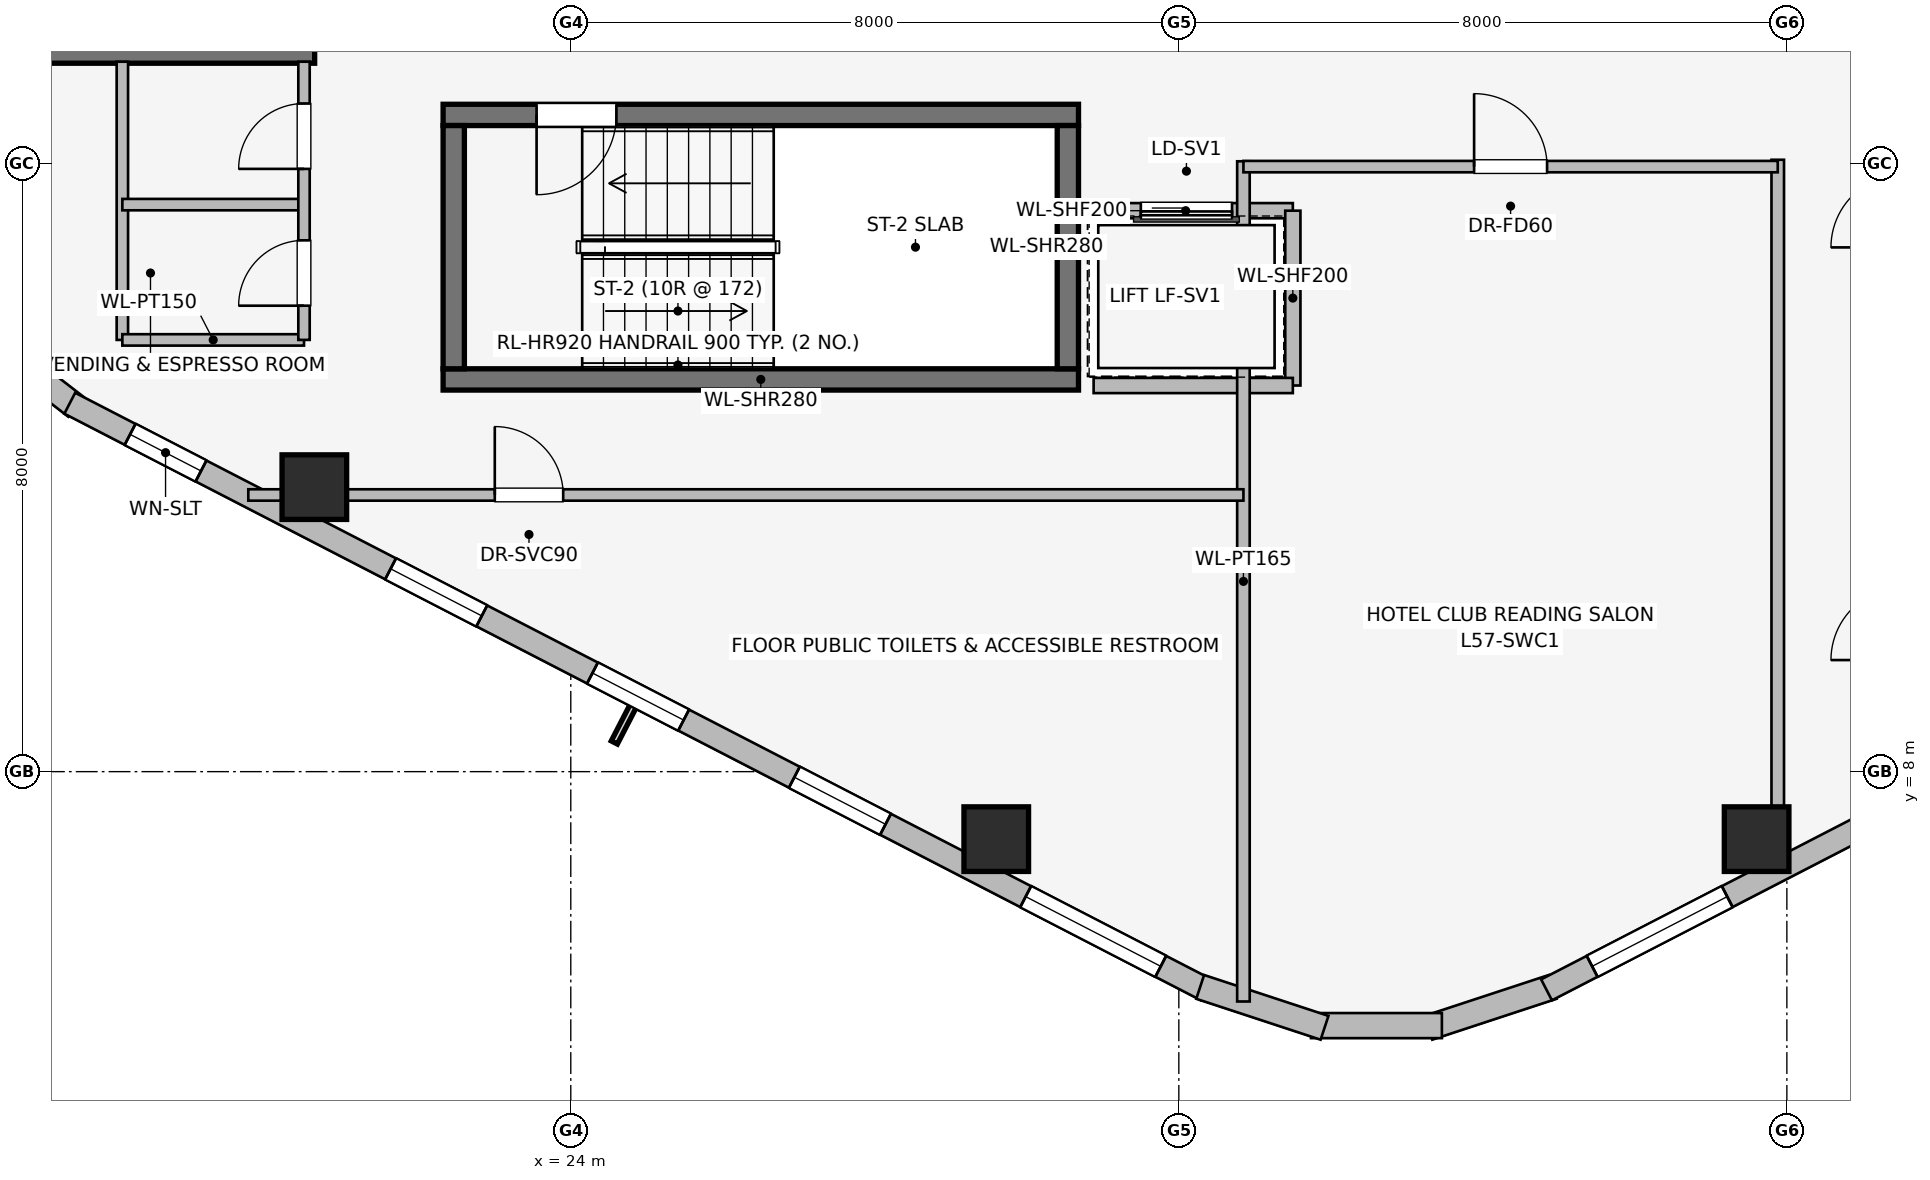
"""IFC4 building model, lengths in metres.
Left out: names, types, materials, properties, quantities, classifications, styles, units other than length and angle.
Written with IfcOpenShell. Run it as: python <this file> out.ifc"""

import sys

from ifc_helpers import new_model, si_unit, direction, frame, frame_2d, origin, origin_2d, place, context, subcontext, project, spatial, rectangle, extrude, element, fill, save


model = new_model("IFC4")
c1 = context("Model", 3, precision=1e-05, world=origin(), true_north=direction((0.0, 1.0)))
c2 = subcontext(c1, "Body", "Model", "MODEL_VIEW")
j1 = project(units=[si_unit("LENGTHUNIT", "METRE"), si_unit("PLANEANGLEUNIT", "RADIAN")], contexts=[c1])
p1 = place(None, origin())
s1 = spatial("IfcSite", under=j1, at=p1, CompositionType="ELEMENT")
p2 = place(p1, origin())
s2 = spatial("IfcBuilding", under=s1, at=p2, CompositionType="ELEMENT")
p3 = place(p2, frame((0.0, 0.0, 210.25)))
s3 = spatial("IfcBuildingStorey", under=s2, at=p3, CompositionType="ELEMENT", Elevation=210.25)
p4 = place(p3, frame((16.87, 17.46, 0.0), z_axis=(0.0, 0.0, 1.0), x_axis=(1.0, 0.0, 0.0)))
e1 = element("IfcWall", 1, at=p4, inside=s3, PredefinedType="SHEAR", context=c2, shape_type="SweptSolid", body=[
    extrude(rectangle(XDim=3.76, YDim=0.28, at=frame_2d((1.88, 0.0))), origin(), (0.0, 0.0, 1.0), 3.45),
])
p5 = place(p3, frame((22.32, 13.16, 0.0), z_axis=(0.0, 0.0, 1.0), x_axis=(1.0, 0.0, 0.0)))
e2 = element("IfcWall", 2, at=p5, inside=s3, PredefinedType="SHEAR", context=c2, shape_type="SweptSolid", body=[
    extrude(rectangle(XDim=8.36, YDim=0.28, at=frame_2d((4.18, 0.0))), origin(), (0.0, 0.0, 1.0), 3.45),
])
p6 = place(p3, frame((30.68, 16.64, 0.0), z_axis=(0.0, 0.0, 1.0), x_axis=(-1.0, 0.0, 0.0)))
e3 = element("IfcWall", 3, at=p6, inside=s3, PredefinedType="SHEAR", context=c2, shape_type="SweptSolid", body=[
    extrude(rectangle(XDim=8.36, YDim=0.28, at=frame_2d((4.18, 0.0))), origin(), (0.0, 0.0, 1.0), 3.45),
])
p7 = place(p6, frame((6.08, 0.0, 0.0)))
e4 = element("IfcOpeningElement", 4, at=p7, cuts=e3, PredefinedType="OPENING", context=c2, shape_type="SweptSolid", body=[
    extrude(rectangle(XDim=1.05, YDim=2.0, at=frame_2d((0.525, 1.0))), frame((0.0, 0.15, 0.0), z_axis=(0.0, -1.0, 0.0), x_axis=(1.0, 0.0, 0.0)), (0.0, 0.0, 1.0), 0.3),
])
for number, where, z_axis, x_axis in (
    (5, (22.46, 16.5, 0.0), (0.0, 0.0, 1.0), (0.0, -1.0, 0.0)),
    (6, (30.54, 13.3, 0.0), (0.0, 0.0, 1.0), (0.0, 1.0, 0.0)),
):
    element("IfcWall", number, at=place(p3, frame(where, z_axis=z_axis, x_axis=x_axis)), inside=s3, PredefinedType="SHEAR", context=c2, shape_type="SweptSolid", body=[
        extrude(rectangle(XDim=3.2, YDim=0.28, at=frame_2d((1.6, 0.0))), origin(), (0.0, 0.0, 1.0), 3.45),
    ])
for number, where, z_axis, x_axis in (
    (7, (20.626, 11.743, 0.0), (0.0, 0.0, 1.0), (1.0, 0.0, 0.0)),
    (8, (29.598, 7.112, 0.0), (0.0, 0.0, 1.0), (1.0, 0.0, 0.0)),
    (9, (39.602, 7.112, 0.0), (0.0, 0.0, 1.0), (1.0, 0.0, 0.0)),
):
    element("IfcColumn", number, at=place(p3, frame(where, z_axis=z_axis, x_axis=x_axis)), inside=s3, PredefinedType="COLUMN", context=c2, shape_type="SweptSolid", body=[
        extrude(rectangle(XDim=0.85, YDim=0.85, at=origin_2d()), origin(), (0.0, 0.0, 1.0), 3.45),
    ])
p8 = place(p3, frame((17.489, 12.8, 0.0), z_axis=(0.0, 0.0, 1.0), x_axis=(-0.791409877269, 0.611285862884, 0.0)))
e10 = element("IfcWall", 10, at=p8, inside=s3, PredefinedType="STANDARD", context=c2, shape_type="SweptSolid", body=[
    extrude(rectangle(XDim=1.677, YDim=0.33, at=frame_2d((0.838, 0.0))), origin(), (0.0, 0.0, 1.0), 3.19),
])
p9 = place(p3, frame((32.362, 5.129, 0.0), z_axis=(0.0, 0.0, 1.0), x_axis=(-0.888626188278, 0.458632202867, 0.0)))
e11 = element("IfcWall", 11, at=p9, inside=s3, PredefinedType="STANDARD", context=c2, shape_type="SweptSolid", body=[
    extrude(rectangle(XDim=16.828, YDim=0.31, at=frame_2d((8.414, 0.0))), origin(), (0.0, 0.0, 1.0), 3.19),
])
p10 = place(p9, frame((0.675, 0.0, 0.75)))
e12 = element("IfcOpeningElement", 12, at=p10, cuts=e11, PredefinedType="OPENING", context=c2, shape_type="SweptSolid", body=[
    extrude(rectangle(XDim=2.0, YDim=1.5, at=frame_2d((1.0, 0.75))), frame((0.0, 0.165, 0.0), z_axis=(0.0, -1.0, 0.0), x_axis=(1.0, 0.0, 0.0)), (0.0, 0.0, 1.0), 0.33),
])
p11 = place(p9, frame((4.75, 0.0, 0.75)))
e13 = element("IfcOpeningElement", 13, at=p11, cuts=e11, PredefinedType="OPENING", context=c2, shape_type="SweptSolid", body=[
    extrude(rectangle(XDim=1.35, YDim=1.45, at=frame_2d((0.675, 0.725))), frame((0.0, 0.165, 0.0), z_axis=(0.0, -1.0, 0.0), x_axis=(1.0, 0.0, 0.0)), (0.0, 0.0, 1.0), 0.33),
])
p12 = place(p9, frame((7.739, 0.0, 0.75)))
e14 = element("IfcOpeningElement", 14, at=p12, cuts=e11, PredefinedType="OPENING", context=c2, shape_type="SweptSolid", body=[
    extrude(rectangle(XDim=1.35, YDim=1.45, at=frame_2d((0.675, 0.725))), frame((0.0, 0.165, 0.0), z_axis=(0.0, -1.0, 0.0), x_axis=(1.0, 0.0, 0.0)), (0.0, 0.0, 1.0), 0.33),
])
p13 = place(p9, frame((10.728, 0.0, 0.75)))
e15 = element("IfcOpeningElement", 15, at=p13, cuts=e11, PredefinedType="OPENING", context=c2, shape_type="SweptSolid", body=[
    extrude(rectangle(XDim=1.35, YDim=1.45, at=frame_2d((0.675, 0.725))), frame((0.0, 0.165, 0.0), z_axis=(0.0, -1.0, 0.0), x_axis=(1.0, 0.0, 0.0)), (0.0, 0.0, 1.0), 0.33),
])
p14 = place(p9, frame((14.885, 0.0, 0.75)))
e16 = element("IfcOpeningElement", 16, at=p14, cuts=e11, PredefinedType="OPENING", context=c2, shape_type="SweptSolid", body=[
    extrude(rectangle(XDim=1.05, YDim=1.4, at=frame_2d((0.525, 0.7))), frame((0.0, 0.165, 0.0), z_axis=(0.0, -1.0, 0.0), x_axis=(1.0, 0.0, 0.0)), (0.0, 0.0, 1.0), 0.33),
])
p15 = place(p3, frame((36.919, 5.168, 0.0), z_axis=(0.0, 0.0, 1.0), x_axis=(-0.949937416267, -0.312440242569, 0.0)))
e17 = element("IfcWall", 17, at=p15, inside=s3, PredefinedType="STANDARD", context=c2, shape_type="SweptSolid", body=[
    extrude(rectangle(XDim=1.722, YDim=0.33, at=frame_2d((0.861, 0.0))), origin(), (0.0, 0.0, 1.0), 3.19),
])
p16 = place(p3, frame((35.461, 4.659, 0.0), z_axis=(0.0, 0.0, 1.0), x_axis=(-1.0, 0.0, 0.0)))
e18 = element("IfcWall", 18, at=p16, inside=s3, PredefinedType="STANDARD", context=c2, shape_type="SweptSolid", body=[
    extrude(rectangle(XDim=1.722, YDim=0.33, at=frame_2d((0.861, 0.0))), origin(), (0.0, 0.0, 1.0), 3.19),
])
p17 = place(p3, frame((33.917, 4.63, 0.0), z_axis=(0.0, 0.0, 1.0), x_axis=(-0.949937416267, 0.312440242569, 0.0)))
e19 = element("IfcWall", 19, at=p17, inside=s3, PredefinedType="STANDARD", context=c2, shape_type="SweptSolid", body=[
    extrude(rectangle(XDim=1.722, YDim=0.33, at=frame_2d((0.861, 0.0))), origin(), (0.0, 0.0, 1.0), 3.19),
])
p18 = place(p3, frame((51.792, 12.847, 0.0), z_axis=(0.0, 0.0, 1.0), x_axis=(-0.888626188278, -0.458632202867, 0.0)))
e20 = element("IfcWall", 20, at=p18, inside=s3, PredefinedType="STANDARD", context=c2, shape_type="SweptSolid", body=[
    extrude(rectangle(XDim=16.828, YDim=0.31, at=frame_2d((8.414, 0.0))), origin(), (0.0, 0.0, 1.0), 3.19),
])
p19 = place(p18, frame((1.3, 0.0, 0.75)))
e21 = element("IfcOpeningElement", 21, at=p19, cuts=e20, PredefinedType="OPENING", context=c2, shape_type="SweptSolid", body=[
    extrude(rectangle(XDim=1.05, YDim=1.4, at=frame_2d((0.525, 0.7))), frame((0.0, 0.165, 0.0), z_axis=(0.0, -1.0, 0.0), x_axis=(1.0, 0.0, 0.0)), (0.0, 0.0, 1.0), 0.33),
])
p20 = place(p18, frame((4.486, 0.0, 0.75)))
e22 = element("IfcOpeningElement", 22, at=p20, cuts=e20, PredefinedType="OPENING", context=c2, shape_type="SweptSolid", body=[
    extrude(rectangle(XDim=1.35, YDim=1.45, at=frame_2d((0.675, 0.725))), frame((0.0, 0.165, 0.0), z_axis=(0.0, -1.0, 0.0), x_axis=(1.0, 0.0, 0.0)), (0.0, 0.0, 1.0), 0.33),
])
p21 = place(p18, frame((6.946, 0.0, 0.75)))
e23 = element("IfcOpeningElement", 23, at=p21, cuts=e20, PredefinedType="OPENING", context=c2, shape_type="SweptSolid", body=[
    extrude(rectangle(XDim=1.35, YDim=1.45, at=frame_2d((0.675, 0.725))), frame((0.0, 0.165, 0.0), z_axis=(0.0, -1.0, 0.0), x_axis=(1.0, 0.0, 0.0)), (0.0, 0.0, 1.0), 0.33),
])
p22 = place(p18, frame((9.406, 0.0, 0.75)))
e24 = element("IfcOpeningElement", 24, at=p22, cuts=e20, PredefinedType="OPENING", context=c2, shape_type="SweptSolid", body=[
    extrude(rectangle(XDim=1.35, YDim=1.45, at=frame_2d((0.675, 0.725))), frame((0.0, 0.165, 0.0), z_axis=(0.0, -1.0, 0.0), x_axis=(1.0, 0.0, 0.0)), (0.0, 0.0, 1.0), 0.33),
])
p23 = place(p18, frame((14.153, 0.0, 0.75)))
e25 = element("IfcOpeningElement", 25, at=p23, cuts=e20, PredefinedType="OPENING", context=c2, shape_type="SweptSolid", body=[
    extrude(rectangle(XDim=2.0, YDim=1.5, at=frame_2d((1.0, 0.75))), frame((0.0, 0.165, 0.0), z_axis=(0.0, -1.0, 0.0), x_axis=(1.0, 0.0, 0.0)), (0.0, 0.0, 1.0), 0.33),
])
p24 = place(p3, frame((33.5, 15.38, 0.0), z_axis=(0.0, 0.0, 1.0), x_axis=(-1.0, 0.0, 0.0)))
e26 = element("IfcWall", 26, at=p24, inside=s3, PredefinedType="PARTITIONING", context=c2, shape_type="SweptSolid", body=[
    extrude(rectangle(XDim=2.82, YDim=0.2, at=frame_2d((1.41, 0.0))), origin(), (0.0, 0.0, 1.0), 3.19),
])
p25 = place(p24, frame((0.8, 0.0, 0.0)))
e27 = element("IfcOpeningElement", 27, at=p25, cuts=e26, PredefinedType="OPENING", context=c2, shape_type="SweptSolid", body=[
    extrude(rectangle(XDim=1.2, YDim=2.2, at=frame_2d((0.6, 1.1))), frame((0.0, 0.11, 0.0), z_axis=(0.0, -1.0, 0.0), x_axis=(1.0, 0.0, 0.0)), (0.0, 0.0, 1.0), 0.22),
])
p26 = place(p3, frame((33.5, 13.08, 0.0), z_axis=(0.0, 0.0, 1.0), x_axis=(0.0, 1.0, 0.0)))
e28 = element("IfcWall", 28, at=p26, inside=s3, PredefinedType="PARTITIONING", context=c2, shape_type="SweptSolid", body=[
    extrude(rectangle(XDim=2.3, YDim=0.2, at=frame_2d((1.15, 0.0))), origin(), (0.0, 0.0, 1.0), 3.19),
])
p27 = place(p3, frame((30.879, 13.08, 0.0), z_axis=(0.0, 0.0, 1.0), x_axis=(1.0, 0.0, 0.0)))
e29 = element("IfcWall", 29, at=p27, inside=s3, PredefinedType="PARTITIONING", context=c2, shape_type="SweptSolid", body=[
    extrude(rectangle(XDim=2.621, YDim=0.2, at=frame_2d((1.311, 0.0))), origin(), (0.0, 0.0, 1.0), 3.19),
])
p28 = place(p3, frame((18.1, 17.34, 0.0), z_axis=(0.0, 0.0, 1.0), x_axis=(0.0, -1.0, 0.0)))
e30 = element("IfcWall", 30, at=p28, inside=s3, PredefinedType="PARTITIONING", context=c2, shape_type="SweptSolid", body=[
    extrude(rectangle(XDim=3.66, YDim=0.15, at=frame_2d((1.83, 0.0))), origin(), (0.0, 0.0, 1.0), 3.19),
])
for number, where, z_axis, x_axis in (
    (31, (18.1, 13.68, 0.0), (0.0, 0.0, 1.0), (1.0, 0.0, 0.0)),
    (32, (18.1, 15.46, 0.0), (0.0, 0.0, 1.0), (1.0, 0.0, 0.0)),
):
    element("IfcWall", number, at=place(p3, frame(where, z_axis=z_axis, x_axis=x_axis)), inside=s3, PredefinedType="PARTITIONING", context=c2, shape_type="SweptSolid", body=[
        extrude(rectangle(XDim=2.39, YDim=0.15, at=frame_2d((1.195, 0.0))), origin(), (0.0, 0.0, 1.0), 3.19),
    ])
p29 = place(p3, frame((20.49, 13.68, 0.0), z_axis=(0.0, 0.0, 1.0), x_axis=(0.0, 1.0, 0.0)))
e33 = element("IfcWall", 33, at=p29, inside=s3, PredefinedType="PARTITIONING", context=c2, shape_type="SweptSolid", body=[
    extrude(rectangle(XDim=3.66, YDim=0.15, at=frame_2d((1.83, 0.0))), origin(), (0.0, 0.0, 1.0), 3.19),
])
p30 = place(p29, frame((0.45, 0.0, 0.0)))
e34 = element("IfcOpeningElement", 34, at=p30, cuts=e33, PredefinedType="OPENING", context=c2, shape_type="SweptSolid", body=[
    extrude(rectangle(XDim=0.86, YDim=2.0, at=frame_2d((0.43, 1.0))), frame((0.0, 0.085, 0.0), z_axis=(0.0, -1.0, 0.0), x_axis=(1.0, 0.0, 0.0)), (0.0, 0.0, 1.0), 0.17),
])
p31 = place(p29, frame((2.25, 0.0, 0.0)))
e35 = element("IfcOpeningElement", 35, at=p31, cuts=e33, PredefinedType="OPENING", context=c2, shape_type="SweptSolid", body=[
    extrude(rectangle(XDim=0.86, YDim=2.0, at=frame_2d((0.43, 1.0))), frame((0.0, 0.085, 0.0), z_axis=(0.0, -1.0, 0.0), x_axis=(1.0, 0.0, 0.0)), (0.0, 0.0, 1.0), 0.17),
])
p32 = place(p3, frame((32.85, 4.976, 0.0), z_axis=(0.0, 0.0, 1.0), x_axis=(0.0, 1.0, 0.0)))
e36 = element("IfcWall", 36, at=p32, inside=s3, PredefinedType="PARTITIONING", context=c2, shape_type="SweptSolid", body=[
    extrude(rectangle(XDim=11.054, YDim=0.165, at=frame_2d((5.527, 0.0))), origin(), (0.0, 0.0, 1.0), 3.19),
])
p33 = place(p3, frame((19.757, 11.64, 0.0), z_axis=(0.0, 0.0, 1.0), x_axis=(1.0, 0.0, 0.0)))
e37 = element("IfcWall", 37, at=p33, inside=s3, PredefinedType="PARTITIONING", context=c2, shape_type="SweptSolid", body=[
    extrude(rectangle(XDim=13.093, YDim=0.15, at=frame_2d((6.546, 0.0))), origin(), (0.0, 0.0, 1.0), 3.19),
])
p34 = place(p33, frame((3.243, 0.0, 0.0)))
e38 = element("IfcOpeningElement", 38, at=p34, cuts=e37, PredefinedType="OPENING", context=c2, shape_type="SweptSolid", body=[
    extrude(rectangle(XDim=0.9, YDim=2.0, at=frame_2d((0.45, 1.0))), frame((0.0, 0.085, 0.0), z_axis=(0.0, -1.0, 0.0), x_axis=(1.0, 0.0, 0.0)), (0.0, 0.0, 1.0), 0.17),
])
p35 = place(p3, frame((39.88, 6.704, 0.0), z_axis=(0.0, 0.0, 1.0), x_axis=(0.0, 1.0, 0.0)))
e39 = element("IfcWall", 39, at=p35, inside=s3, PredefinedType="PARTITIONING", context=c2, shape_type="SweptSolid", body=[
    extrude(rectangle(XDim=9.346, YDim=0.165, at=frame_2d((4.673, 0.0))), origin(), (0.0, 0.0, 1.0), 2.497),
])
p36 = place(p3, frame((32.85, 15.96, 0.0), z_axis=(0.0, 0.0, 1.0), x_axis=(1.0, 0.0, 0.0)))
e40 = element("IfcWall", 40, at=p36, inside=s3, PredefinedType="PARTITIONING", context=c2, shape_type="SweptSolid", body=[
    extrude(rectangle(XDim=7.03, YDim=0.15, at=frame_2d((3.515, 0.0))), origin(), (0.0, 0.0, 1.0), 3.19),
])
p37 = place(p36, frame((3.035, 0.0, 0.0)))
e41 = element("IfcOpeningElement", 41, at=p37, cuts=e40, PredefinedType="OPENING", context=c2, shape_type="SweptSolid", body=[
    extrude(rectangle(XDim=0.96, YDim=2.0, at=frame_2d((0.48, 1.0))), frame((0.0, 0.085, 0.0), z_axis=(0.0, -1.0, 0.0), x_axis=(1.0, 0.0, 0.0)), (0.0, 0.0, 1.0), 0.17),
])
p38 = place(p10, origin())
e42 = element("IfcWindow", 42, at=p38, inside=s3, PartitioningType="SINGLE_PANEL", PredefinedType="WINDOW", context=c2, shape_type="SweptSolid", body=[
    extrude(rectangle(XDim=2.0, YDim=1.5, at=frame_2d((1.0, 0.75))), frame((0.0, 0.03, 0.0), z_axis=(0.0, -1.0, 0.0), x_axis=(1.0, 0.0, 0.0)), (0.0, 0.0, 1.0), 0.06),
])
fill(e12, e42)
p39 = place(p11, origin())
e43 = element("IfcWindow", 43, at=p39, inside=s3, PartitioningType="SINGLE_PANEL", PredefinedType="WINDOW", context=c2, shape_type="SweptSolid", body=[
    extrude(rectangle(XDim=1.35, YDim=1.45, at=frame_2d((0.675, 0.725))), frame((0.0, 0.03, 0.0), z_axis=(0.0, -1.0, 0.0), x_axis=(1.0, 0.0, 0.0)), (0.0, 0.0, 1.0), 0.06),
])
fill(e13, e43)
p40 = place(p12, origin())
e44 = element("IfcWindow", 44, at=p40, inside=s3, PartitioningType="SINGLE_PANEL", PredefinedType="WINDOW", context=c2, shape_type="SweptSolid", body=[
    extrude(rectangle(XDim=1.35, YDim=1.45, at=frame_2d((0.675, 0.725))), frame((0.0, 0.03, 0.0), z_axis=(0.0, -1.0, 0.0), x_axis=(1.0, 0.0, 0.0)), (0.0, 0.0, 1.0), 0.06),
])
fill(e14, e44)
p41 = place(p13, origin())
e45 = element("IfcWindow", 45, at=p41, inside=s3, PartitioningType="SINGLE_PANEL", PredefinedType="WINDOW", context=c2, shape_type="SweptSolid", body=[
    extrude(rectangle(XDim=1.35, YDim=1.45, at=frame_2d((0.675, 0.725))), frame((0.0, 0.03, 0.0), z_axis=(0.0, -1.0, 0.0), x_axis=(1.0, 0.0, 0.0)), (0.0, 0.0, 1.0), 0.06),
])
fill(e15, e45)
p42 = place(p14, origin())
e46 = element("IfcWindow", 46, at=p42, inside=s3, PartitioningType="SINGLE_PANEL", PredefinedType="WINDOW", context=c2, shape_type="SweptSolid", body=[
    extrude(rectangle(XDim=1.05, YDim=1.4, at=frame_2d((0.525, 0.7))), frame((0.0, 0.03, 0.0), z_axis=(0.0, -1.0, 0.0), x_axis=(1.0, 0.0, 0.0)), (0.0, 0.0, 1.0), 0.06),
])
fill(e16, e46)
p43 = place(p23, origin())
e47 = element("IfcWindow", 47, at=p43, inside=s3, PartitioningType="SINGLE_PANEL", PredefinedType="WINDOW", context=c2, shape_type="SweptSolid", body=[
    extrude(rectangle(XDim=2.0, YDim=1.5, at=frame_2d((1.0, 0.75))), frame((0.0, 0.03, 0.0), z_axis=(0.0, -1.0, 0.0), x_axis=(1.0, 0.0, 0.0)), (0.0, 0.0, 1.0), 0.06),
])
fill(e25, e47)
p44 = place(p7, origin())
e48 = element("IfcDoor", 48, at=p44, inside=s3, OperationType="SINGLE_SWING_RIGHT", PredefinedType="DOOR", context=c2, shape_type="SweptSolid", body=[
    extrude(rectangle(XDim=1.05, YDim=2.0, at=frame_2d((0.525, 1.0))), frame((0.0, 0.025, 0.0), z_axis=(0.0, -1.0, 0.0), x_axis=(1.0, 0.0, 0.0)), (0.0, 0.0, 1.0), 0.05),
])
fill(e4, e48)
p45 = place(p25, origin())
e49 = element("IfcDoor", 49, at=p45, inside=s3, OperationType="SLIDING_TO_RIGHT", PredefinedType="DOOR", context=c2, shape_type="SweptSolid", body=[
    extrude(rectangle(XDim=1.2, YDim=2.2, at=frame_2d((0.6, 1.1))), frame((0.0, 0.025, 0.0), z_axis=(0.0, -1.0, 0.0), x_axis=(1.0, 0.0, 0.0)), (0.0, 0.0, 1.0), 0.05),
])
fill(e27, e49)
p46 = place(p30, origin())
e50 = element("IfcDoor", 50, at=p46, inside=s3, OperationType="SINGLE_SWING_LEFT", PredefinedType="DOOR", context=c2, shape_type="SweptSolid", body=[
    extrude(rectangle(XDim=0.86, YDim=2.0, at=frame_2d((0.43, 1.0))), frame((0.0, 0.025, 0.0), z_axis=(0.0, -1.0, 0.0), x_axis=(1.0, 0.0, 0.0)), (0.0, 0.0, 1.0), 0.05),
])
fill(e34, e50)
p47 = place(p31, origin())
e51 = element("IfcDoor", 51, at=p47, inside=s3, OperationType="SINGLE_SWING_LEFT", PredefinedType="DOOR", context=c2, shape_type="SweptSolid", body=[
    extrude(rectangle(XDim=0.86, YDim=2.0, at=frame_2d((0.43, 1.0))), frame((0.0, 0.025, 0.0), z_axis=(0.0, -1.0, 0.0), x_axis=(1.0, 0.0, 0.0)), (0.0, 0.0, 1.0), 0.05),
])
fill(e35, e51)
p48 = place(p34, origin())
e52 = element("IfcDoor", 52, at=p48, inside=s3, OperationType="SINGLE_SWING_LEFT", PredefinedType="DOOR", context=c2, shape_type="SweptSolid", body=[
    extrude(rectangle(XDim=0.9, YDim=2.0, at=frame_2d((0.45, 1.0))), frame((0.0, 0.025, 0.0), z_axis=(0.0, -1.0, 0.0), x_axis=(1.0, 0.0, 0.0)), (0.0, 0.0, 1.0), 0.05),
])
fill(e38, e52)
p49 = place(p37, origin())
e53 = element("IfcDoor", 53, at=p49, inside=s3, OperationType="SINGLE_SWING_LEFT", PredefinedType="DOOR", context=c2, shape_type="SweptSolid", body=[
    extrude(rectangle(XDim=0.96, YDim=2.0, at=frame_2d((0.48, 1.0))), frame((0.0, 0.025, 0.0), z_axis=(0.0, -1.0, 0.0), x_axis=(1.0, 0.0, 0.0)), (0.0, 0.0, 1.0), 0.05),
])
fill(e41, e53)
save(model, sys.argv[1])
